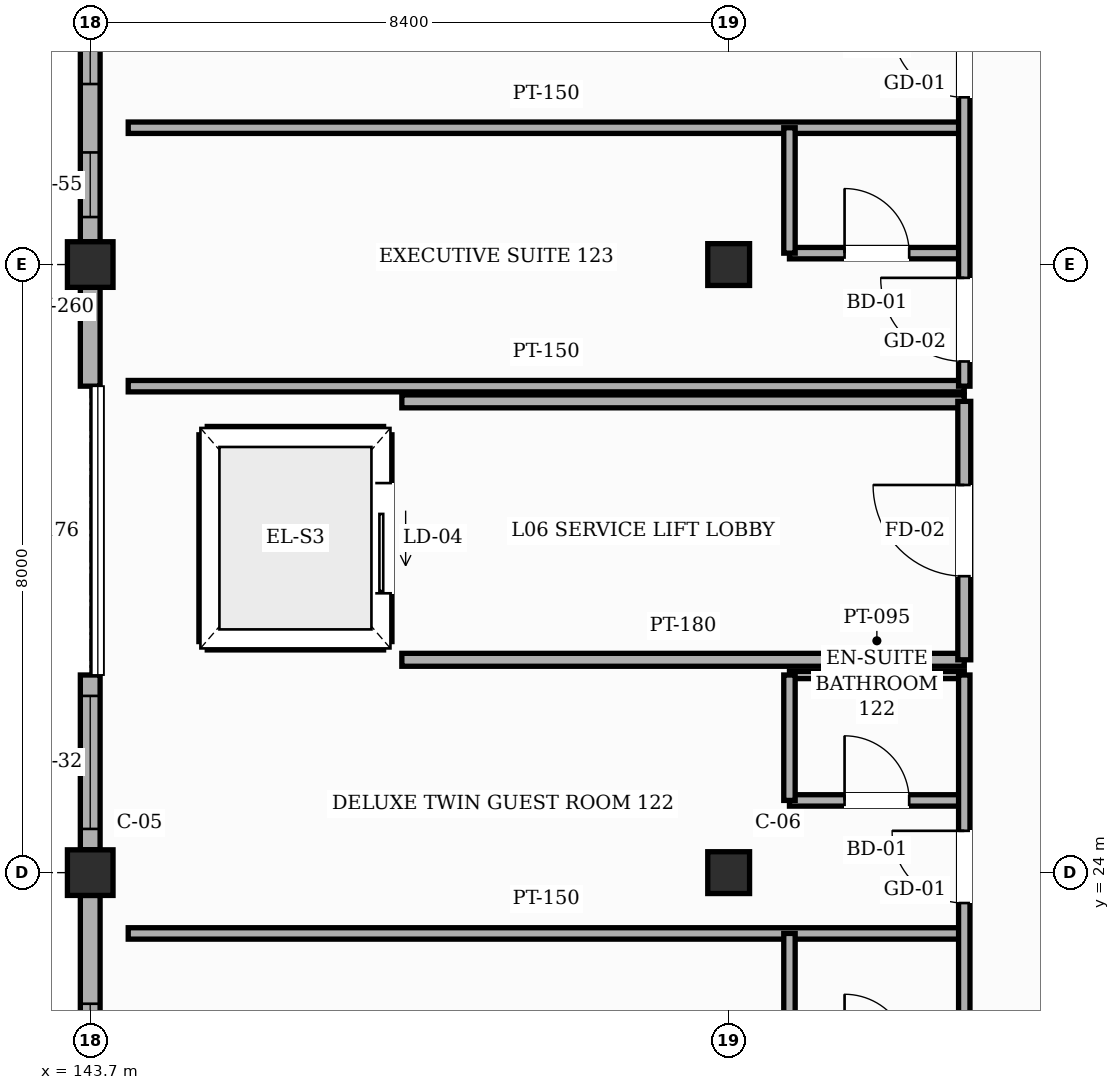
"""IFC4 building model, lengths in metres.
Left out: names, types, materials, properties, quantities, classifications, styles, units other than length and angle.
Written with IfcOpenShell. Run it as: python <this file> out.ifc"""

import sys

from ifc_helpers import new_model, si_unit, direction, frame, frame_2d, origin, origin_2d, place, context, subcontext, project, spatial, rectangle, hollow_rectangle, extrude, element, fill, save


model = new_model("IFC4")
c1 = context("Model", 3, precision=1e-05, world=origin(), true_north=direction((0.0, 1.0)))
c2 = subcontext(c1, "Body", "Model", "MODEL_VIEW")
j1 = project(units=[si_unit("LENGTHUNIT", "METRE"), si_unit("PLANEANGLEUNIT", "RADIAN")], contexts=[c1])
p1 = place(None, origin())
s1 = spatial("IfcSite", under=j1, at=p1, CompositionType="ELEMENT")
p2 = place(p1, origin())
s2 = spatial("IfcBuilding", under=s1, at=p2, CompositionType="ELEMENT")
p3 = place(p2, frame((0.0, 0.0, 28.2)))
s3 = spatial("IfcBuildingStorey", under=s2, at=p3, CompositionType="ELEMENT", Elevation=28.2)
for number, where, z_axis, x_axis in (
    (1, (143.7, 24.0, 0.0), (0.0, 0.0, 1.0), (1.0, 0.0, 0.0)),
    (2, (143.7, 32.0, 0.0), (0.0, 0.0, 1.0), (1.0, 0.0, 0.0)),
):
    element("IfcColumn", number, at=place(p3, frame(where, z_axis=z_axis, x_axis=x_axis)), inside=s3, PredefinedType="COLUMN", context=c2, shape_type="SweptSolid", body=[
        extrude(hollow_rectangle(XDim=0.6, YDim=0.6, WallThickness=0.025, InnerFilletRadius=0.025, OuterFilletRadius=0.05, at=origin_2d()), origin(), (0.0, 0.0, 1.0), 3.6),
    ])
for number, where, z_axis, x_axis in (
    (3, (152.1, 24.0, 0.0), (0.0, 0.0, 1.0), (1.0, 0.0, 0.0)),
    (4, (152.1, 32.0, 0.0), (0.0, 0.0, 1.0), (1.0, 0.0, 0.0)),
):
    element("IfcColumn", number, at=place(p3, frame(where, z_axis=z_axis, x_axis=x_axis)), inside=s3, PredefinedType="COLUMN", context=c2, shape_type="SweptSolid", body=[
        extrude(hollow_rectangle(XDim=0.55, YDim=0.55, WallThickness=0.022, InnerFilletRadius=0.022, OuterFilletRadius=0.044, at=origin_2d()), origin(), (0.0, 0.0, 1.0), 3.6),
    ])
p4 = place(p3, frame((143.7, 16.3, 0.0), z_axis=(0.0, 0.0, 1.0), x_axis=(0.0, 1.0, 0.0)))
e5 = element("IfcWall", 5, at=p4, inside=s3, PredefinedType="SOLIDWALL", context=c2, shape_type="SweptSolid", body=[
    extrude(rectangle(XDim=7.4, YDim=0.26, at=frame_2d((3.7, 0.0))), origin(), (0.0, 0.0, 1.0), 2.805),
])
p5 = place(p4, frame((1.125, 0.0, 0.85)))
e6 = element("IfcOpeningElement", 6, at=p5, cuts=e5, PredefinedType="OPENING", context=c2, shape_type="SweptSolid", body=[
    extrude(rectangle(XDim=1.35, YDim=1.5, at=frame_2d((0.675, 0.75))), frame((0.0, 0.14, 0.0), z_axis=(0.0, -1.0, 0.0), x_axis=(1.0, 0.0, 0.0)), (0.0, 0.0, 1.0), 0.28),
])
p6 = place(p4, frame((4.425, 0.0, 0.85)))
e7 = element("IfcOpeningElement", 7, at=p6, cuts=e5, PredefinedType="OPENING", context=c2, shape_type="SweptSolid", body=[
    extrude(rectangle(XDim=1.55, YDim=1.5, at=frame_2d((0.775, 0.75))), frame((0.0, 0.14, 0.0), z_axis=(0.0, -1.0, 0.0), x_axis=(1.0, 0.0, 0.0)), (0.0, 0.0, 1.0), 0.28),
])
p7 = place(p3, frame((143.7, 24.3, 0.0), z_axis=(0.0, 0.0, 1.0), x_axis=(0.0, 1.0, 0.0)))
e8 = element("IfcWall", 8, at=p7, inside=s3, PredefinedType="SOLIDWALL", context=c2, shape_type="SweptSolid", body=[
    extrude(rectangle(XDim=2.3, YDim=0.26, at=frame_2d((1.15, 0.0))), origin(), (0.0, 0.0, 1.0), 2.805),
])
p8 = place(p7, frame((0.275, 0.0, 0.85)))
e9 = element("IfcOpeningElement", 9, at=p8, cuts=e8, PredefinedType="OPENING", context=c2, shape_type="SweptSolid", body=[
    extrude(rectangle(XDim=1.75, YDim=1.5, at=frame_2d((0.875, 0.75))), frame((0.0, 0.14, 0.0), z_axis=(0.0, -1.0, 0.0), x_axis=(1.0, 0.0, 0.0)), (0.0, 0.0, 1.0), 0.28),
])
p9 = place(p3, frame((143.7, 30.4, 0.0), z_axis=(0.0, 0.0, 1.0), x_axis=(0.0, 1.0, 0.0)))
e10 = element("IfcWall", 10, at=p9, inside=s3, PredefinedType="SOLIDWALL", context=c2, shape_type="SweptSolid", body=[
    extrude(rectangle(XDim=1.3, YDim=0.26, at=frame_2d((0.65, 0.0))), origin(), (0.0, 0.0, 1.0), 2.805),
])
p10 = place(p3, frame((143.7, 32.3, 0.0), z_axis=(0.0, 0.0, 1.0), x_axis=(0.0, 1.0, 0.0)))
e11 = element("IfcWall", 11, at=p10, inside=s3, PredefinedType="SOLIDWALL", context=c2, shape_type="SweptSolid", body=[
    extrude(rectangle(XDim=8.3, YDim=0.26, at=frame_2d((4.15, 0.0))), origin(), (0.0, 0.0, 1.0), 2.655),
])
p11 = place(p10, frame((0.325, 0.0, 0.85)))
e12 = element("IfcOpeningElement", 12, at=p11, cuts=e11, PredefinedType="OPENING", context=c2, shape_type="SweptSolid", body=[
    extrude(rectangle(XDim=0.85, YDim=1.35, at=frame_2d((0.425, 0.675))), frame((0.0, 0.14, 0.0), z_axis=(0.0, -1.0, 0.0), x_axis=(1.0, 0.0, 0.0)), (0.0, 0.0, 1.0), 0.28),
])
p12 = place(p10, frame((2.075, 0.0, 0.85)))
e13 = element("IfcOpeningElement", 13, at=p12, cuts=e11, PredefinedType="OPENING", context=c2, shape_type="SweptSolid", body=[
    extrude(rectangle(XDim=2.25, YDim=1.5, at=frame_2d((1.125, 0.75))), frame((0.0, 0.14, 0.0), z_axis=(0.0, -1.0, 0.0), x_axis=(1.0, 0.0, 0.0)), (0.0, 0.0, 1.0), 0.28),
])
p13 = place(p10, frame((5.925, 0.0, 0.85)))
e14 = element("IfcOpeningElement", 14, at=p13, cuts=e11, PredefinedType="OPENING", context=c2, shape_type="SweptSolid", body=[
    extrude(rectangle(XDim=1.35, YDim=1.35, at=frame_2d((0.675, 0.675))), frame((0.0, 0.14, 0.0), z_axis=(0.0, -1.0, 0.0), x_axis=(1.0, 0.0, 0.0)), (0.0, 0.0, 1.0), 0.28),
])
for number, where, z_axis, x_axis in (
    (15, (145.24, 29.76, 0.0), (0.0, 0.0, 1.0), (1.0, 0.0, 0.0)),
    (16, (145.24, 27.04, 0.0), (0.0, 0.0, 1.0), (1.0, 0.0, 0.0)),
):
    element("IfcWall", number, at=place(p3, frame(where, z_axis=z_axis, x_axis=x_axis)), inside=s3, PredefinedType="SHEAR", context=c2, shape_type="SweptSolid", body=[
        extrude(rectangle(XDim=2.32, YDim=0.22, at=frame_2d((1.16, 0.0))), origin(), (0.0, 0.0, 1.0), 3.38),
    ])
p14 = place(p3, frame((147.56, 27.04, 0.0), z_axis=(0.0, 0.0, 1.0), x_axis=(0.0, 1.0, 0.0)))
e17 = element("IfcWall", 17, at=p14, inside=s3, PredefinedType="SHEAR", context=c2, shape_type="SweptSolid", body=[
    extrude(rectangle(XDim=2.72, YDim=0.22, at=frame_2d((1.36, 0.0))), origin(), (0.0, 0.0, 1.0), 3.38),
])
p15 = place(p14, frame((0.635, 0.0, 0.0)))
e18 = element("IfcOpeningElement", 18, at=p15, cuts=e17, PredefinedType="OPENING", context=c2, shape_type="SweptSolid", body=[
    extrude(rectangle(XDim=1.45, YDim=2.35, at=frame_2d((0.725, 1.175))), frame((0.0, 0.12, 0.0), z_axis=(0.0, -1.0, 0.0), x_axis=(1.0, 0.0, 0.0)), (0.0, 0.0, 1.0), 0.24),
])
p16 = place(p3, frame((145.24, 27.04, 0.0), z_axis=(0.0, 0.0, 1.0), x_axis=(0.0, 1.0, 0.0)))
e19 = element("IfcWall", 19, at=p16, inside=s3, PredefinedType="SHEAR", context=c2, shape_type="SweptSolid", body=[
    extrude(rectangle(XDim=2.72, YDim=0.22, at=frame_2d((1.36, 0.0))), origin(), (0.0, 0.0, 1.0), 3.38),
])
p17 = place(p3, frame((144.2, 23.2, 0.0), z_axis=(0.0, 0.0, 1.0), x_axis=(1.0, 0.0, 0.0)))
e20 = element("IfcWall", 20, at=p17, inside=s3, PredefinedType="PARTITIONING", context=c2, shape_type="SweptSolid", body=[
    extrude(rectangle(XDim=11.0, YDim=0.15, at=frame_2d((5.5, 0.0))), origin(), (0.0, 0.0, 1.0), 3.365),
])
p18 = place(p3, frame((152.9, 24.95, 0.0), z_axis=(0.0, 0.0, 1.0), x_axis=(1.0, 0.0, 0.0)))
e21 = element("IfcWall", 21, at=p18, inside=s3, PredefinedType="PARTITIONING", context=c2, shape_type="SweptSolid", body=[
    extrude(rectangle(XDim=2.3, YDim=0.15, at=frame_2d((1.15, 0.0))), origin(), (0.0, 0.0, 1.0), 3.365),
])
p19 = place(p18, frame((0.725, 0.0, 0.0)))
e22 = element("IfcOpeningElement", 22, at=p19, cuts=e21, PredefinedType="OPENING", context=c2, shape_type="SweptSolid", body=[
    extrude(rectangle(XDim=0.85, YDim=2.1, at=frame_2d((0.425, 1.05))), frame((0.0, 0.085, 0.0), z_axis=(0.0, -1.0, 0.0), x_axis=(1.0, 0.0, 0.0)), (0.0, 0.0, 1.0), 0.17),
])
p20 = place(p3, frame((152.9, 26.6, 0.0), z_axis=(0.0, 0.0, 1.0), x_axis=(1.0, 0.0, 0.0)))
e23 = element("IfcWall", 23, at=p20, inside=s3, PredefinedType="PARTITIONING", context=c2, shape_type="SweptSolid", body=[
    extrude(rectangle(XDim=2.3, YDim=0.095, at=frame_2d((1.15, 0.0))), origin(), (0.0, 0.0, 1.0), 3.365),
])
for number, where, z_axis, x_axis in (
    (24, (147.8, 26.8, 0.0), (0.0, 0.0, 1.0), (1.0, 0.0, 0.0)),
    (25, (147.8, 30.2, 0.0), (0.0, 0.0, 1.0), (1.0, 0.0, 0.0)),
):
    element("IfcWall", number, at=place(p3, frame(where, z_axis=z_axis, x_axis=x_axis)), inside=s3, PredefinedType="PARTITIONING", context=c2, shape_type="SweptSolid", body=[
        extrude(rectangle(XDim=7.4, YDim=0.17, at=frame_2d((3.7, 0.0))), origin(), (0.0, 0.0, 1.0), 3.365),
    ])
p21 = place(p3, frame((144.2, 30.4, 0.0), z_axis=(0.0, 0.0, 1.0), x_axis=(1.0, 0.0, 0.0)))
e26 = element("IfcWall", 26, at=p21, inside=s3, PredefinedType="PARTITIONING", context=c2, shape_type="SweptSolid", body=[
    extrude(rectangle(XDim=11.0, YDim=0.15, at=frame_2d((5.5, 0.0))), origin(), (0.0, 0.0, 1.0), 3.365),
])
p22 = place(p3, frame((152.9, 32.15, 0.0), z_axis=(0.0, 0.0, 1.0), x_axis=(1.0, 0.0, 0.0)))
e27 = element("IfcWall", 27, at=p22, inside=s3, PredefinedType="PARTITIONING", context=c2, shape_type="SweptSolid", body=[
    extrude(rectangle(XDim=2.3, YDim=0.15, at=frame_2d((1.15, 0.0))), origin(), (0.0, 0.0, 1.0), 2.805),
])
p23 = place(p22, frame((0.725, 0.0, 0.0)))
e28 = element("IfcOpeningElement", 28, at=p23, cuts=e27, PredefinedType="OPENING", context=c2, shape_type="SweptSolid", body=[
    extrude(rectangle(XDim=0.85, YDim=2.1, at=frame_2d((0.425, 1.05))), frame((0.0, 0.085, 0.0), z_axis=(0.0, -1.0, 0.0), x_axis=(1.0, 0.0, 0.0)), (0.0, 0.0, 1.0), 0.17),
])
p24 = place(p3, frame((144.2, 33.8, 0.0), z_axis=(0.0, 0.0, 1.0), x_axis=(1.0, 0.0, 0.0)))
e29 = element("IfcWall", 29, at=p24, inside=s3, PredefinedType="PARTITIONING", context=c2, shape_type="SweptSolid", body=[
    extrude(rectangle(XDim=11.0, YDim=0.15, at=frame_2d((5.5, 0.0))), origin(), (0.0, 0.0, 1.0), 3.365),
])
p25 = place(p3, frame((152.9, 21.55, 0.0), z_axis=(0.0, 0.0, 1.0), x_axis=(0.0, 1.0, 0.0)))
e30 = element("IfcWall", 30, at=p25, inside=s3, PredefinedType="PARTITIONING", context=c2, shape_type="SweptSolid", body=[
    extrude(rectangle(XDim=1.65, YDim=0.15, at=frame_2d((0.825, 0.0))), origin(), (0.0, 0.0, 1.0), 3.365),
])
for number, where, z_axis, x_axis in (
    (31, (152.9, 24.95, 0.0), (0.0, 0.0, 1.0), (0.0, 1.0, 0.0)),
    (32, (152.9, 32.15, 0.0), (0.0, 0.0, 1.0), (0.0, 1.0, 0.0)),
):
    element("IfcWall", number, at=place(p3, frame(where, z_axis=z_axis, x_axis=x_axis)), inside=s3, PredefinedType="PARTITIONING", context=c2, shape_type="SweptSolid", body=[
        extrude(rectangle(XDim=1.65, YDim=0.15, at=frame_2d((0.825, 0.0))), origin(), (0.0, 0.0, 1.0), 3.365),
    ])
p26 = place(p3, frame((155.2, 1.0, 0.0), z_axis=(0.0, 0.0, 1.0), x_axis=(0.0, 1.0, 0.0)))
e33 = element("IfcWall", 33, at=p26, inside=s3, PredefinedType="PARTITIONING", context=c2, shape_type="SweptSolid", body=[
    extrude(rectangle(XDim=25.6, YDim=0.15, at=frame_2d((12.8, 0.0))), origin(), (0.0, 0.0, 1.0), 3.365),
])
p27 = place(p26, frame((5.25, 0.0, 0.0)))
e34 = element("IfcOpeningElement", 34, at=p27, cuts=e33, PredefinedType="OPENING", context=c2, shape_type="SweptSolid", body=[
    extrude(rectangle(XDim=1.5, YDim=2.3, at=frame_2d((0.75, 1.15))), frame((0.0, 0.085, 0.0), z_axis=(0.0, -1.0, 0.0), x_axis=(1.0, 0.0, 0.0)), (0.0, 0.0, 1.0), 0.17),
])
p28 = place(p26, frame((12.325, 0.0, 0.0)))
e35 = element("IfcOpeningElement", 35, at=p28, cuts=e33, PredefinedType="OPENING", context=c2, shape_type="SweptSolid", body=[
    extrude(rectangle(XDim=1.1, YDim=2.2, at=frame_2d((0.55, 1.1))), frame((0.0, 0.085, 0.0), z_axis=(0.0, -1.0, 0.0), x_axis=(1.0, 0.0, 0.0)), (0.0, 0.0, 1.0), 0.17),
])
p29 = place(p26, frame((15.8, 0.0, 0.0)))
e36 = element("IfcOpeningElement", 36, at=p29, cuts=e33, PredefinedType="OPENING", context=c2, shape_type="SweptSolid", body=[
    extrude(rectangle(XDim=0.95, YDim=2.15, at=frame_2d((0.475, 1.075))), frame((0.0, 0.085, 0.0), z_axis=(0.0, -1.0, 0.0), x_axis=(1.0, 0.0, 0.0)), (0.0, 0.0, 1.0), 0.17),
])
p30 = place(p26, frame((19.2, 0.0, 0.0)))
e37 = element("IfcOpeningElement", 37, at=p30, cuts=e33, PredefinedType="OPENING", context=c2, shape_type="SweptSolid", body=[
    extrude(rectangle(XDim=0.95, YDim=2.15, at=frame_2d((0.475, 1.075))), frame((0.0, 0.085, 0.0), z_axis=(0.0, -1.0, 0.0), x_axis=(1.0, 0.0, 0.0)), (0.0, 0.0, 1.0), 0.17),
])
p31 = place(p26, frame((22.6, 0.0, 0.0)))
e38 = element("IfcOpeningElement", 38, at=p31, cuts=e33, PredefinedType="OPENING", context=c2, shape_type="SweptSolid", body=[
    extrude(rectangle(XDim=0.95, YDim=2.15, at=frame_2d((0.475, 1.075))), frame((0.0, 0.085, 0.0), z_axis=(0.0, -1.0, 0.0), x_axis=(1.0, 0.0, 0.0)), (0.0, 0.0, 1.0), 0.17),
])
p32 = place(p3, frame((155.2, 26.8, 0.0), z_axis=(0.0, 0.0, 1.0), x_axis=(0.0, 1.0, 0.0)))
e39 = element("IfcWall", 39, at=p32, inside=s3, PredefinedType="PARTITIONING", context=c2, shape_type="SweptSolid", body=[
    extrude(rectangle(XDim=3.4, YDim=0.17, at=frame_2d((1.7, 0.0))), origin(), (0.0, 0.0, 1.0), 3.365),
])
p33 = place(p32, frame((1.1, 0.0, 0.0)))
e40 = element("IfcOpeningElement", 40, at=p33, cuts=e39, PredefinedType="OPENING", context=c2, shape_type="SweptSolid", body=[
    extrude(rectangle(XDim=1.2, YDim=2.2, at=frame_2d((0.6, 1.1))), frame((0.0, 0.095, 0.0), z_axis=(0.0, -1.0, 0.0), x_axis=(1.0, 0.0, 0.0)), (0.0, 0.0, 1.0), 0.19),
])
p34 = place(p3, frame((155.2, 30.4, 0.0), z_axis=(0.0, 0.0, 1.0), x_axis=(0.0, 1.0, 0.0)))
e41 = element("IfcWall", 41, at=p34, inside=s3, PredefinedType="PARTITIONING", context=c2, shape_type="SweptSolid", body=[
    extrude(rectangle(XDim=10.2, YDim=0.15, at=frame_2d((5.1, 0.0))), origin(), (0.0, 0.0, 1.0), 3.365),
])
p35 = place(p34, frame((0.325, 0.0, 0.0)))
e42 = element("IfcOpeningElement", 42, at=p35, cuts=e41, PredefinedType="OPENING", context=c2, shape_type="SweptSolid", body=[
    extrude(rectangle(XDim=1.1, YDim=2.2, at=frame_2d((0.55, 1.1))), frame((0.0, 0.085, 0.0), z_axis=(0.0, -1.0, 0.0), x_axis=(1.0, 0.0, 0.0)), (0.0, 0.0, 1.0), 0.17),
])
p36 = place(p34, frame((3.8, 0.0, 0.0)))
e43 = element("IfcOpeningElement", 43, at=p36, cuts=e41, PredefinedType="OPENING", context=c2, shape_type="SweptSolid", body=[
    extrude(rectangle(XDim=0.95, YDim=2.15, at=frame_2d((0.475, 1.075))), frame((0.0, 0.085, 0.0), z_axis=(0.0, -1.0, 0.0), x_axis=(1.0, 0.0, 0.0)), (0.0, 0.0, 1.0), 0.17),
])
p37 = place(p34, frame((7.2, 0.0, 0.0)))
e44 = element("IfcOpeningElement", 44, at=p37, cuts=e41, PredefinedType="OPENING", context=c2, shape_type="SweptSolid", body=[
    extrude(rectangle(XDim=0.95, YDim=2.15, at=frame_2d((0.475, 1.075))), frame((0.0, 0.085, 0.0), z_axis=(0.0, -1.0, 0.0), x_axis=(1.0, 0.0, 0.0)), (0.0, 0.0, 1.0), 0.17),
])
p38 = place(p6, origin())
e45 = element("IfcWindow", 45, at=p38, inside=s3, PartitioningType="SINGLE_PANEL", PredefinedType="WINDOW", context=c2, shape_type="SweptSolid", body=[
    extrude(rectangle(XDim=1.55, YDim=1.5, at=frame_2d((0.775, 0.75))), frame((0.0, 0.03, 0.0), z_axis=(0.0, -1.0, 0.0), x_axis=(1.0, 0.0, 0.0)), (0.0, 0.0, 1.0), 0.06),
])
fill(e7, e45)
p39 = place(p8, origin())
e46 = element("IfcWindow", 46, at=p39, inside=s3, PartitioningType="SINGLE_PANEL", PredefinedType="WINDOW", context=c2, shape_type="SweptSolid", body=[
    extrude(rectangle(XDim=1.75, YDim=1.5, at=frame_2d((0.875, 0.75))), frame((0.0, 0.03, 0.0), z_axis=(0.0, -1.0, 0.0), x_axis=(1.0, 0.0, 0.0)), (0.0, 0.0, 1.0), 0.06),
])
fill(e9, e46)
p40 = place(p11, origin())
e47 = element("IfcWindow", 47, at=p40, inside=s3, PartitioningType="SINGLE_PANEL", PredefinedType="WINDOW", context=c2, shape_type="SweptSolid", body=[
    extrude(rectangle(XDim=0.85, YDim=1.35, at=frame_2d((0.425, 0.675))), frame((0.0, 0.03, 0.0), z_axis=(0.0, -1.0, 0.0), x_axis=(1.0, 0.0, 0.0)), (0.0, 0.0, 1.0), 0.06),
])
fill(e12, e47)
p41 = place(p12, origin())
e48 = element("IfcWindow", 48, at=p41, inside=s3, PartitioningType="SINGLE_PANEL", PredefinedType="WINDOW", context=c2, shape_type="SweptSolid", body=[
    extrude(rectangle(XDim=2.25, YDim=1.5, at=frame_2d((1.125, 0.75))), frame((0.0, 0.03, 0.0), z_axis=(0.0, -1.0, 0.0), x_axis=(1.0, 0.0, 0.0)), (0.0, 0.0, 1.0), 0.06),
])
fill(e13, e48)
p42 = place(p15, origin())
e49 = element("IfcDoor", 49, at=p42, inside=s3, OperationType="SLIDING_TO_LEFT", PredefinedType="DOOR", context=c2, shape_type="SweptSolid", body=[
    extrude(rectangle(XDim=1.45, YDim=2.35, at=frame_2d((0.725, 1.175))), frame((0.0, 0.025, 0.0), z_axis=(0.0, -1.0, 0.0), x_axis=(1.0, 0.0, 0.0)), (0.0, 0.0, 1.0), 0.05),
])
fill(e18, e49)
p43 = place(p33, origin())
e50 = element("IfcDoor", 50, at=p43, inside=s3, OperationType="SINGLE_SWING_RIGHT", PredefinedType="DOOR", context=c2, shape_type="SweptSolid", body=[
    extrude(rectangle(XDim=1.2, YDim=2.2, at=frame_2d((0.6, 1.1))), frame((0.0, 0.025, 0.0), z_axis=(0.0, -1.0, 0.0), x_axis=(1.0, 0.0, 0.0)), (0.0, 0.0, 1.0), 0.05),
])
fill(e40, e50)
p44 = place(p31, origin())
e51 = element("IfcDoor", 51, at=p44, inside=s3, OperationType="SINGLE_SWING_RIGHT", PredefinedType="DOOR", context=c2, shape_type="SweptSolid", body=[
    extrude(rectangle(XDim=0.95, YDim=2.15, at=frame_2d((0.475, 1.075))), frame((0.0, 0.025, 0.0), z_axis=(0.0, -1.0, 0.0), x_axis=(1.0, 0.0, 0.0)), (0.0, 0.0, 1.0), 0.05),
])
fill(e38, e51)
p45 = place(p19, origin())
e52 = element("IfcDoor", 52, at=p45, inside=s3, OperationType="SINGLE_SWING_LEFT", PredefinedType="DOOR", context=c2, shape_type="SweptSolid", body=[
    extrude(rectangle(XDim=0.85, YDim=2.1, at=frame_2d((0.425, 1.05))), frame((0.0, 0.025, 0.0), z_axis=(0.0, -1.0, 0.0), x_axis=(1.0, 0.0, 0.0)), (0.0, 0.0, 1.0), 0.05),
])
fill(e22, e52)
p46 = place(p35, origin())
e53 = element("IfcDoor", 53, at=p46, inside=s3, OperationType="SINGLE_SWING_RIGHT", PredefinedType="DOOR", context=c2, shape_type="SweptSolid", body=[
    extrude(rectangle(XDim=1.1, YDim=2.2, at=frame_2d((0.55, 1.1))), frame((0.0, 0.025, 0.0), z_axis=(0.0, -1.0, 0.0), x_axis=(1.0, 0.0, 0.0)), (0.0, 0.0, 1.0), 0.05),
])
fill(e42, e53)
p47 = place(p23, origin())
e54 = element("IfcDoor", 54, at=p47, inside=s3, OperationType="SINGLE_SWING_LEFT", PredefinedType="DOOR", context=c2, shape_type="SweptSolid", body=[
    extrude(rectangle(XDim=0.85, YDim=2.1, at=frame_2d((0.425, 1.05))), frame((0.0, 0.025, 0.0), z_axis=(0.0, -1.0, 0.0), x_axis=(1.0, 0.0, 0.0)), (0.0, 0.0, 1.0), 0.05),
])
fill(e28, e54)
p48 = place(p36, origin())
e55 = element("IfcDoor", 55, at=p48, inside=s3, OperationType="SINGLE_SWING_RIGHT", PredefinedType="DOOR", context=c2, shape_type="SweptSolid", body=[
    extrude(rectangle(XDim=0.95, YDim=2.15, at=frame_2d((0.475, 1.075))), frame((0.0, 0.025, 0.0), z_axis=(0.0, -1.0, 0.0), x_axis=(1.0, 0.0, 0.0)), (0.0, 0.0, 1.0), 0.05),
])
fill(e43, e55)
save(model, sys.argv[1])
